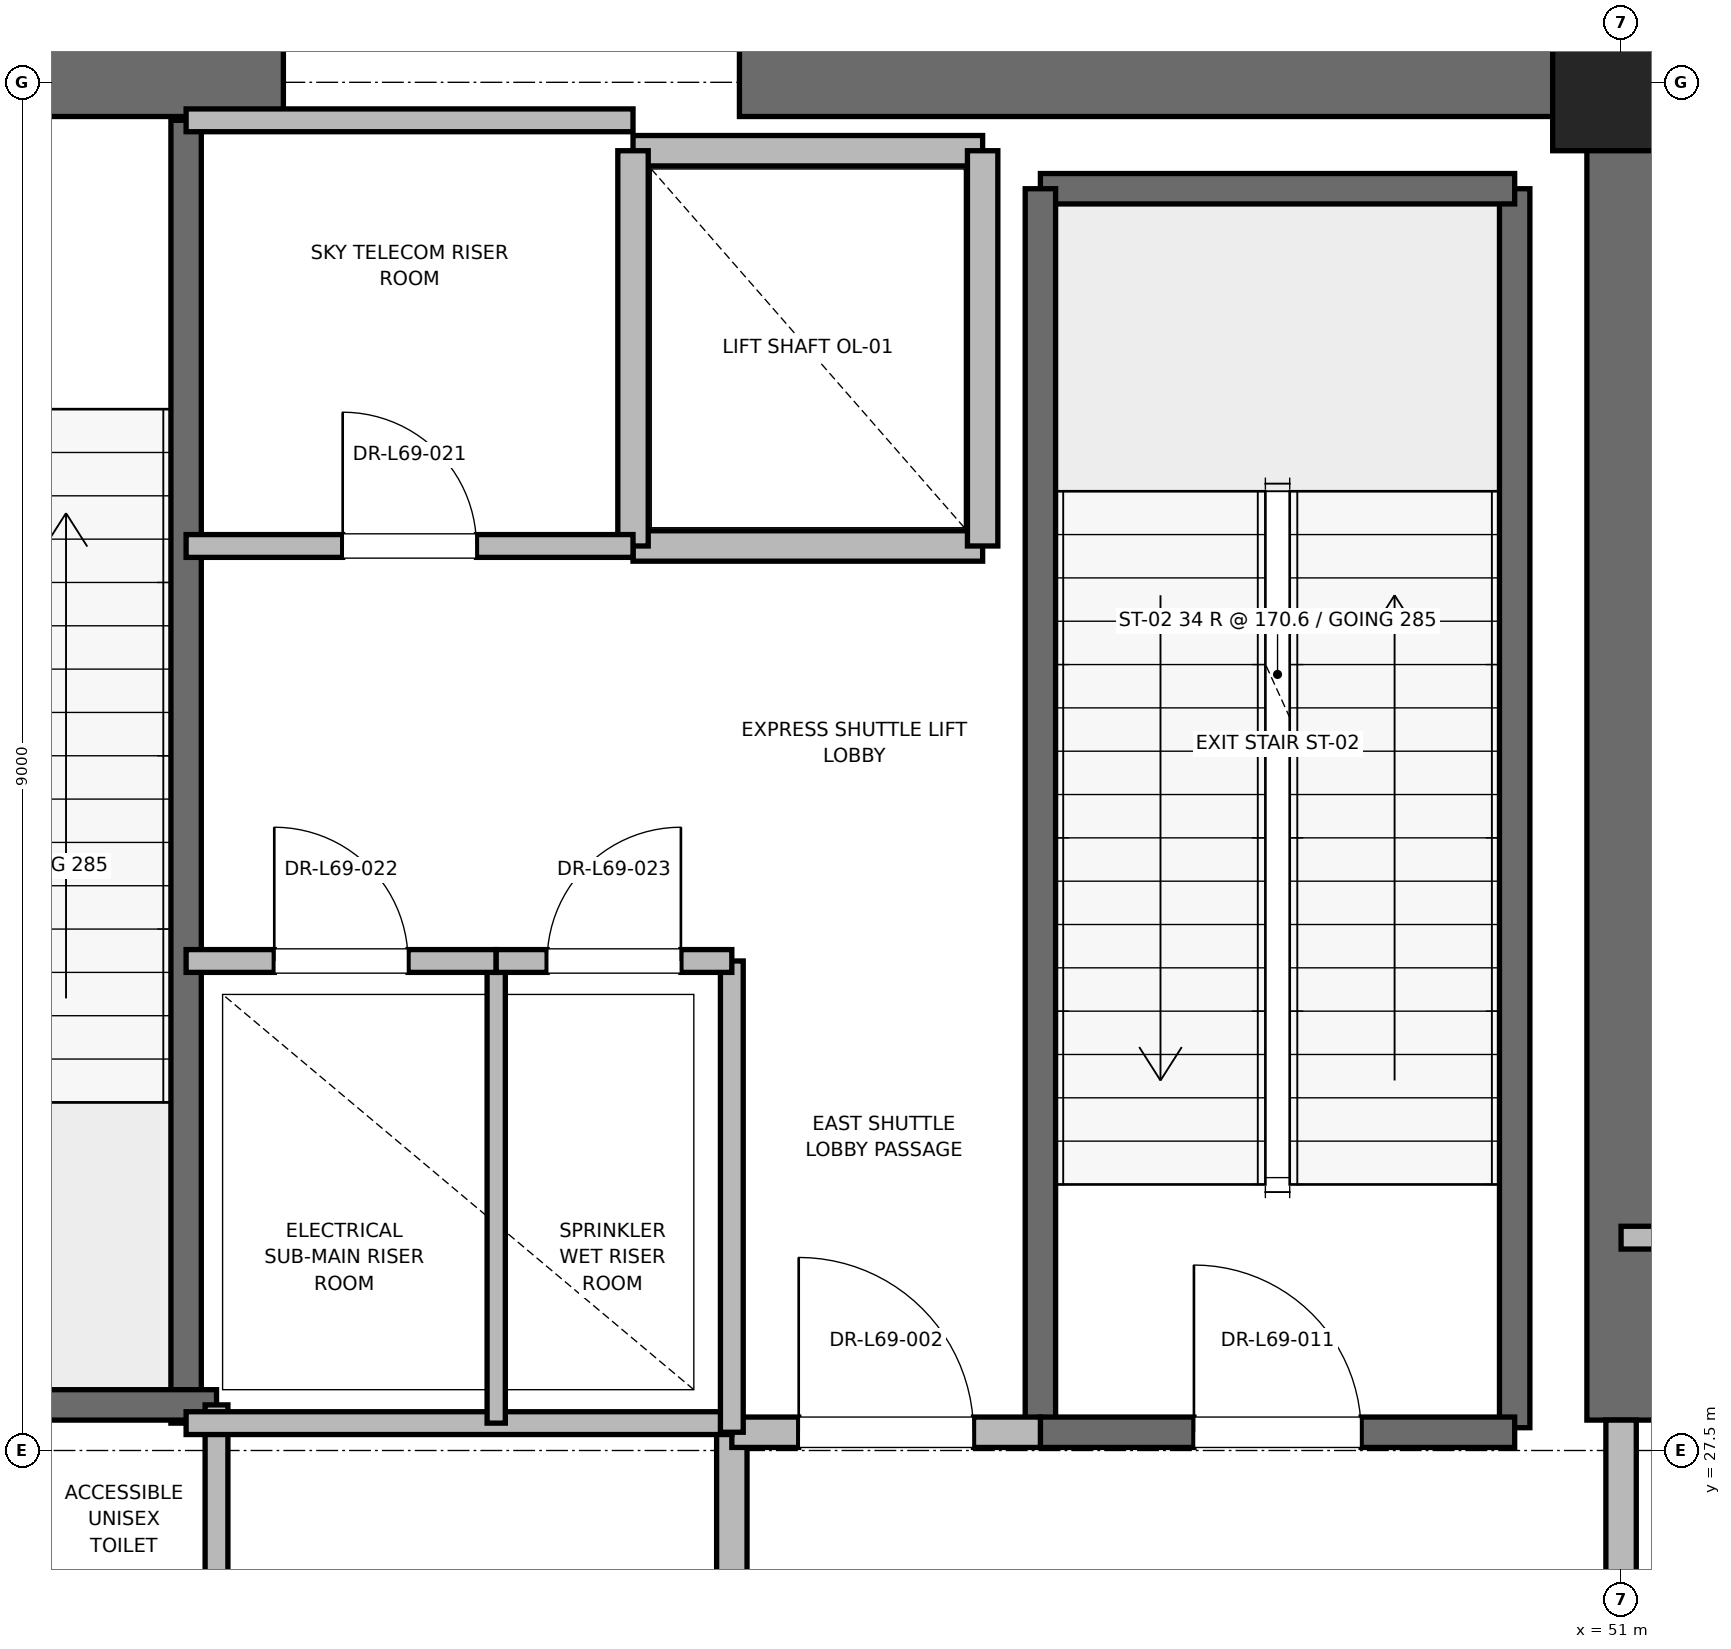
"""IFC4 building model, lengths in metres.
Left out: names, types, materials, properties, quantities, classifications, styles, units other than length and angle.
Written with IfcOpenShell. Run it as: python <this file> out.ifc"""

import sys

from ifc_helpers import new_model, si_unit, direction, frame, frame_2d, origin, origin_2d, place, context, subcontext, project, spatial, rectangle, extrude, element, fill, save


model = new_model("IFC4")
c1 = context("Model", 3, precision=1e-05, world=origin(), true_north=direction((0.0, 1.0)))
c2 = subcontext(c1, "Body", "Model", "MODEL_VIEW")
j1 = project(units=[si_unit("LENGTHUNIT", "METRE"), si_unit("PLANEANGLEUNIT", "RADIAN")], contexts=[c1])
p1 = place(None, origin())
s1 = spatial("IfcSite", under=j1, at=p1, CompositionType="ELEMENT")
p2 = place(p1, origin())
s2 = spatial("IfcBuilding", under=s1, at=p2, CompositionType="ELEMENT")
p3 = place(p2, frame((0.0, 0.0, 295.2)))
s3 = spatial("IfcBuildingStorey", under=s2, at=p3, CompositionType="ELEMENT", Elevation=295.2)
p4 = place(p3, frame((51.0, 36.5, 0.0), z_axis=(0.0, 0.0, 1.0), x_axis=(1.0, 0.0, 0.0)))
e1 = element("IfcColumn", 1, at=p4, inside=s3, PredefinedType="PILASTER", context=c2, shape_type="SweptSolid", body=[
    extrude(rectangle(XDim=0.9, YDim=0.9, at=origin_2d()), origin(), (0.0, 0.0, 1.0), 5.8),
])
p5 = place(p3, frame((37.8, 36.5, 0.0), z_axis=(0.0, 0.0, 1.0), x_axis=(1.0, 0.0, 0.0)))
e2 = element("IfcWall", 2, at=p5, inside=s3, PredefinedType="SHEAR", context=c2, shape_type="SweptSolid", body=[
    extrude(rectangle(XDim=4.4, YDim=0.45, at=frame_2d((2.2, 0.0))), origin(), (0.0, 0.0, 1.0), 5.5),
])
p6 = place(p5, frame((1.65, 0.0, 0.0)))
e3 = element("IfcOpeningElement", 3, at=p6, cuts=e2, PredefinedType="OPENING", context=c2, shape_type="SweptSolid", body=[
    extrude(rectangle(XDim=1.1, YDim=2.15, at=frame_2d((0.55, 1.075))), frame((0.0, 0.225, 0.0), z_axis=(0.0, -1.0, 0.0), x_axis=(1.0, 0.0, 0.0)), (0.0, 0.0, 1.0), 0.45),
])
p7 = place(p3, frame((45.2, 36.5, 0.0), z_axis=(0.0, 0.0, 1.0), x_axis=(1.0, 0.0, 0.0)))
e4 = element("IfcWall", 4, at=p7, inside=s3, PredefinedType="SHEAR", context=c2, shape_type="SweptSolid", body=[
    extrude(rectangle(XDim=5.8, YDim=0.45, at=frame_2d((2.9, 0.0))), origin(), (0.0, 0.0, 1.0), 5.5),
])
p8 = place(p3, frame((51.0, 27.7, 0.0), z_axis=(0.0, 0.0, 1.0), x_axis=(0.0, 1.0, 0.0)))
e5 = element("IfcWall", 5, at=p8, inside=s3, PredefinedType="SHEAR", context=c2, shape_type="SweptSolid", body=[
    extrude(rectangle(XDim=8.8, YDim=0.45, at=frame_2d((4.4, 0.0))), origin(), (0.0, 0.0, 1.0), 5.5),
])
p9 = place(p3, frame((50.3, 27.65, 0.0), z_axis=(0.0, 0.0, 1.0), x_axis=(0.0, 1.0, 0.0)))
e6 = element("IfcWall", 6, at=p9, inside=s3, PredefinedType="SOLIDWALL", context=c2, shape_type="SweptSolid", body=[
    extrude(rectangle(XDim=8.15, YDim=0.2, at=frame_2d((4.075, 0.0))), origin(), (0.0, 0.0, 1.0), 5.5),
])
p10 = place(p3, frame((47.18, 35.8, 0.0), z_axis=(0.0, 0.0, 1.0), x_axis=(1.0, 0.0, 0.0)))
e7 = element("IfcWall", 7, at=p10, inside=s3, PredefinedType="SOLIDWALL", context=c2, shape_type="SweptSolid", body=[
    extrude(rectangle(XDim=3.12, YDim=0.2, at=frame_2d((1.56, 0.0))), origin(), (0.0, 0.0, 1.0), 5.5),
])
p11 = place(p3, frame((47.18, 27.62, 0.0), z_axis=(0.0, 0.0, 1.0), x_axis=(0.0, 1.0, 0.0)))
e8 = element("IfcWall", 8, at=p11, inside=s3, PredefinedType="SOLIDWALL", context=c2, shape_type="SweptSolid", body=[
    extrude(rectangle(XDim=8.18, YDim=0.2, at=frame_2d((4.09, 0.0))), origin(), (0.0, 0.0, 1.0), 5.5),
])
p12 = place(p3, frame((47.18, 27.62, 0.0), z_axis=(0.0, 0.0, 1.0), x_axis=(1.0, 0.0, 0.0)))
e9 = element("IfcWall", 9, at=p12, inside=s3, PredefinedType="SOLIDWALL", context=c2, shape_type="SweptSolid", body=[
    extrude(rectangle(XDim=3.12, YDim=0.2, at=frame_2d((1.56, 0.0))), origin(), (0.0, 0.0, 1.0), 5.5),
])
p13 = place(p12, frame((1.01, 0.0, 0.0)))
e10 = element("IfcOpeningElement", 10, at=p13, cuts=e9, PredefinedType="OPENING", context=c2, shape_type="SweptSolid", body=[
    extrude(rectangle(XDim=1.1, YDim=2.15, at=frame_2d((0.55, 1.075))), frame((0.0, 0.1, 0.0), z_axis=(0.0, -1.0, 0.0), x_axis=(1.0, 0.0, 0.0)), (0.0, 0.0, 1.0), 0.2),
])
p14 = place(p3, frame((41.56, 27.68, 0.0), z_axis=(0.0, 0.0, 1.0), x_axis=(0.0, 1.0, 0.0)))
e11 = element("IfcWall", 11, at=p14, inside=s3, PredefinedType="SOLIDWALL", context=c2, shape_type="SweptSolid", body=[
    extrude(rectangle(XDim=8.57, YDim=0.2, at=frame_2d((4.285, 0.0))), origin(), (0.0, 0.0, 1.0), 5.5),
])
p15 = place(p3, frame((38.44, 27.8, 0.0), z_axis=(0.0, 0.0, 1.0), x_axis=(1.0, 0.0, 0.0)))
e12 = element("IfcWall", 12, at=p15, inside=s3, PredefinedType="SOLIDWALL", context=c2, shape_type="SweptSolid", body=[
    extrude(rectangle(XDim=3.32, YDim=0.2, at=frame_2d((1.66, 0.0))), origin(), (0.0, 0.0, 1.0), 5.5),
])
p16 = place(p3, frame((45.15, 24.25, 0.0), z_axis=(0.0, 0.0, 1.0), x_axis=(0.0, 1.0, 0.0)))
e13 = element("IfcWall", 13, at=p16, inside=s3, PredefinedType="PARTITIONING", context=c2, shape_type="SweptSolid", body=[
    extrude(rectangle(XDim=3.37, YDim=0.2, at=frame_2d((1.685, 0.0))), origin(), (0.0, 0.0, 1.0), 5.5),
])
p17 = place(p3, frame((45.15, 27.62, 0.0), z_axis=(0.0, 0.0, 1.0), x_axis=(1.0, 0.0, 0.0)))
e14 = element("IfcWall", 14, at=p17, inside=s3, PredefinedType="PARTITIONING", context=c2, shape_type="SweptSolid", body=[
    extrude(rectangle(XDim=2.03, YDim=0.2, at=frame_2d((1.015, 0.0))), origin(), (0.0, 0.0, 1.0), 5.5),
])
p18 = place(p17, frame((0.44, 0.0, 0.0)))
e15 = element("IfcOpeningElement", 15, at=p18, cuts=e14, PredefinedType="OPENING", context=c2, shape_type="SweptSolid", body=[
    extrude(rectangle(XDim=1.15, YDim=2.2, at=frame_2d((0.575, 1.1))), frame((0.0, 0.1, 0.0), z_axis=(0.0, -1.0, 0.0), x_axis=(1.0, 0.0, 0.0)), (0.0, 0.0, 1.0), 0.2),
])
p19 = place(p3, frame((51.0, 24.3, 0.0), z_axis=(0.0, 0.0, 1.0), x_axis=(0.0, 1.0, 0.0)))
e16 = element("IfcWall", 16, at=p19, inside=s3, PredefinedType="PARTITIONING", context=c2, shape_type="SweptSolid", body=[
    extrude(rectangle(XDim=3.4, YDim=0.2, at=frame_2d((1.7, 0.0))), origin(), (0.0, 0.0, 1.0), 4.58),
])
p20 = place(p19, frame((1.125, 0.0, 0.0)))
e17 = element("IfcOpeningElement", 17, at=p20, cuts=e16, PredefinedType="OPENING", context=c2, shape_type="SweptSolid", body=[
    extrude(rectangle(XDim=1.15, YDim=2.2, at=frame_2d((0.575, 1.1))), frame((0.0, 0.1, 0.0), z_axis=(0.0, -1.0, 0.0), x_axis=(1.0, 0.0, 0.0)), (0.0, 0.0, 1.0), 0.2),
])
p21 = place(p3, frame((44.5, 33.45, 0.0), z_axis=(0.0, 0.0, 1.0), x_axis=(1.0, 0.0, 0.0)))
e18 = element("IfcWall", 18, at=p21, inside=s3, PredefinedType="SOLIDWALL", context=c2, shape_type="SweptSolid", body=[
    extrude(rectangle(XDim=2.3, YDim=0.2, at=frame_2d((1.15, 0.0))), origin(), (0.0, 0.0, 1.0), 5.5),
])
p22 = place(p3, frame((46.8, 36.05, 0.0), z_axis=(0.0, 0.0, 1.0), x_axis=(-1.0, 0.0, 0.0)))
e19 = element("IfcWall", 19, at=p22, inside=s3, PredefinedType="SOLIDWALL", context=c2, shape_type="SweptSolid", body=[
    extrude(rectangle(XDim=2.3, YDim=0.2, at=frame_2d((1.15, 0.0))), origin(), (0.0, 0.0, 1.0), 4.58),
])
p23 = place(p3, frame((44.5, 36.05, 0.0), z_axis=(0.0, 0.0, 1.0), x_axis=(0.0, -1.0, 0.0)))
e20 = element("IfcWall", 20, at=p23, inside=s3, PredefinedType="SOLIDWALL", context=c2, shape_type="SweptSolid", body=[
    extrude(rectangle(XDim=2.6, YDim=0.2, at=frame_2d((1.3, 0.0))), origin(), (0.0, 0.0, 1.0), 4.58),
])
p24 = place(p3, frame((46.8, 33.45, 0.0), z_axis=(0.0, 0.0, 1.0), x_axis=(0.0, 1.0, 0.0)))
e21 = element("IfcWall", 21, at=p24, inside=s3, PredefinedType="SOLIDWALL", context=c2, shape_type="SweptSolid", body=[
    extrude(rectangle(XDim=2.6, YDim=0.2, at=frame_2d((1.3, 0.0))), origin(), (0.0, 0.0, 1.0), 5.5),
])
p25 = place(p3, frame((41.76, 23.8, 0.0), z_axis=(0.0, 0.0, 1.0), x_axis=(0.0, 1.0, 0.0)))
e22 = element("IfcWall", 22, at=p25, inside=s3, PredefinedType="PARTITIONING", context=c2, shape_type="SweptSolid", body=[
    extrude(rectangle(XDim=4.0, YDim=0.15, at=frame_2d((2.0, 0.0))), origin(), (0.0, 0.0, 1.0), 2.85),
])
p26 = place(p3, frame((41.56, 27.68, 0.0), z_axis=(0.0, 0.0, 1.0), x_axis=(1.0, 0.0, 0.0)))
e23 = element("IfcWall", 23, at=p26, inside=s3, PredefinedType="PARTITIONING", context=c2, shape_type="SweptSolid", body=[
    extrude(rectangle(XDim=3.59, YDim=0.15, at=frame_2d((1.795, 0.0))), origin(), (0.0, 0.0, 1.0), 2.85),
])
p27 = place(p3, frame((45.15, 27.62, 0.0), z_axis=(0.0, 0.0, 1.0), x_axis=(0.0, 1.0, 0.0)))
e24 = element("IfcWall", 24, at=p27, inside=s3, PredefinedType="PARTITIONING", context=c2, shape_type="SweptSolid", body=[
    extrude(rectangle(XDim=3.1, YDim=0.15, at=frame_2d((1.55, 0.0))), origin(), (0.0, 0.0, 1.0), 2.85),
])
p28 = place(p3, frame((43.6, 27.68, 0.0), z_axis=(0.0, 0.0, 1.0), x_axis=(0.0, 1.0, 0.0)))
e25 = element("IfcWall", 25, at=p28, inside=s3, PredefinedType="PARTITIONING", context=c2, shape_type="SweptSolid", body=[
    extrude(rectangle(XDim=3.04, YDim=0.12, at=frame_2d((1.52, 0.0))), origin(), (0.0, 0.0, 1.0), 2.85),
])
p29 = place(p3, frame((41.56, 30.72, 0.0), z_axis=(0.0, 0.0, 1.0), x_axis=(1.0, 0.0, 0.0)))
e26 = element("IfcWall", 26, at=p29, inside=s3, PredefinedType="PARTITIONING", context=c2, shape_type="SweptSolid", body=[
    extrude(rectangle(XDim=2.04, YDim=0.15, at=frame_2d((1.02, 0.0))), origin(), (0.0, 0.0, 1.0), 2.85),
])
p30 = place(p29, frame((0.58, 0.0, 0.0)))
e27 = element("IfcOpeningElement", 27, at=p30, cuts=e26, PredefinedType="OPENING", context=c2, shape_type="SweptSolid", body=[
    extrude(rectangle(XDim=0.88, YDim=2.1, at=frame_2d((0.44, 1.05))), frame((0.0, 0.075, 0.0), z_axis=(0.0, -1.0, 0.0), x_axis=(1.0, 0.0, 0.0)), (0.0, 0.0, 1.0), 0.15),
])
p31 = place(p3, frame((43.6, 30.72, 0.0), z_axis=(0.0, 0.0, 1.0), x_axis=(1.0, 0.0, 0.0)))
e28 = element("IfcWall", 28, at=p31, inside=s3, PredefinedType="PARTITIONING", context=c2, shape_type="SweptSolid", body=[
    extrude(rectangle(XDim=1.55, YDim=0.15, at=frame_2d((0.775, 0.0))), origin(), (0.0, 0.0, 1.0), 2.85),
])
p32 = place(p31, frame((0.335, 0.0, 0.0)))
e29 = element("IfcOpeningElement", 29, at=p32, cuts=e28, PredefinedType="OPENING", context=c2, shape_type="SweptSolid", body=[
    extrude(rectangle(XDim=0.88, YDim=2.1, at=frame_2d((0.44, 1.05))), frame((0.0, 0.075, 0.0), z_axis=(0.0, -1.0, 0.0), x_axis=(1.0, 0.0, 0.0)), (0.0, 0.0, 1.0), 0.15),
])
p33 = place(p3, frame((41.56, 36.25, 0.0), z_axis=(0.0, 0.0, 1.0), x_axis=(1.0, 0.0, 0.0)))
e30 = element("IfcWall", 30, at=p33, inside=s3, PredefinedType="PARTITIONING", context=c2, shape_type="SweptSolid", body=[
    extrude(rectangle(XDim=2.94, YDim=0.15, at=frame_2d((1.47, 0.0))), origin(), (0.0, 0.0, 1.0), 2.85),
])
p34 = place(p3, frame((41.56, 33.45, 0.0), z_axis=(0.0, 0.0, 1.0), x_axis=(1.0, 0.0, 0.0)))
e31 = element("IfcWall", 31, at=p34, inside=s3, PredefinedType="PARTITIONING", context=c2, shape_type="SweptSolid", body=[
    extrude(rectangle(XDim=2.94, YDim=0.15, at=frame_2d((1.47, 0.0))), origin(), (0.0, 0.0, 1.0), 2.85),
])
p35 = place(p34, frame((1.03, 0.0, 0.0)))
e32 = element("IfcOpeningElement", 32, at=p35, cuts=e31, PredefinedType="OPENING", context=c2, shape_type="SweptSolid", body=[
    extrude(rectangle(XDim=0.88, YDim=2.1, at=frame_2d((0.44, 1.05))), frame((0.0, 0.075, 0.0), z_axis=(0.0, -1.0, 0.0), x_axis=(1.0, 0.0, 0.0)), (0.0, 0.0, 1.0), 0.15),
])
p36 = place(p3, frame((51.0, 28.9, 0.0), z_axis=(0.0, 0.0, 1.0), x_axis=(1.0, 0.0, 0.0)))
e33 = element("IfcWall", 33, at=p36, inside=s3, PredefinedType="PARTITIONING", context=c2, shape_type="SweptSolid", body=[
    extrude(rectangle(XDim=3.0, YDim=0.15, at=frame_2d((1.5, 0.0))), origin(), (0.0, 0.0, 1.0), 2.85),
])
p37 = place(p36, frame((1.025, 0.0, 0.0)))
e34 = element("IfcOpeningElement", 34, at=p37, cuts=e33, PredefinedType="OPENING", context=c2, shape_type="SweptSolid", body=[
    extrude(rectangle(XDim=0.95, YDim=2.15, at=frame_2d((0.475, 1.075))), frame((0.0, 0.075, 0.0), z_axis=(0.0, -1.0, 0.0), x_axis=(1.0, 0.0, 0.0)), (0.0, 0.0, 1.0), 0.15),
])
p38 = place(p13, origin())
e35 = element("IfcDoor", 35, at=p38, inside=s3, OperationType="SINGLE_SWING_LEFT", PredefinedType="DOOR", context=c2, shape_type="SweptSolid", body=[
    extrude(rectangle(XDim=1.1, YDim=2.15, at=frame_2d((0.55, 1.075))), frame((0.0, 0.025, 0.0), z_axis=(0.0, -1.0, 0.0), x_axis=(1.0, 0.0, 0.0)), (0.0, 0.0, 1.0), 0.05),
])
fill(e10, e35)
p39 = place(p18, origin())
e36 = element("IfcDoor", 36, at=p39, inside=s3, OperationType="SINGLE_SWING_LEFT", PredefinedType="DOOR", context=c2, shape_type="SweptSolid", body=[
    extrude(rectangle(XDim=1.15, YDim=2.2, at=frame_2d((0.575, 1.1))), frame((0.0, 0.025, 0.0), z_axis=(0.0, -1.0, 0.0), x_axis=(1.0, 0.0, 0.0)), (0.0, 0.0, 1.0), 0.05),
])
fill(e15, e36)
p40 = place(p30, origin())
e37 = element("IfcDoor", 37, at=p40, inside=s3, OperationType="SINGLE_SWING_LEFT", PredefinedType="DOOR", context=c2, shape_type="SweptSolid", body=[
    extrude(rectangle(XDim=0.88, YDim=2.1, at=frame_2d((0.44, 1.05))), frame((0.0, 0.025, 0.0), z_axis=(0.0, -1.0, 0.0), x_axis=(1.0, 0.0, 0.0)), (0.0, 0.0, 1.0), 0.05),
])
fill(e27, e37)
p41 = place(p32, origin())
e38 = element("IfcDoor", 38, at=p41, inside=s3, OperationType="SINGLE_SWING_RIGHT", PredefinedType="DOOR", context=c2, shape_type="SweptSolid", body=[
    extrude(rectangle(XDim=0.88, YDim=2.1, at=frame_2d((0.44, 1.05))), frame((0.0, 0.025, 0.0), z_axis=(0.0, -1.0, 0.0), x_axis=(1.0, 0.0, 0.0)), (0.0, 0.0, 1.0), 0.05),
])
fill(e29, e38)
p42 = place(p35, origin())
e39 = element("IfcDoor", 39, at=p42, inside=s3, OperationType="SINGLE_SWING_LEFT", PredefinedType="DOOR", context=c2, shape_type="SweptSolid", body=[
    extrude(rectangle(XDim=0.88, YDim=2.1, at=frame_2d((0.44, 1.05))), frame((0.0, 0.025, 0.0), z_axis=(0.0, -1.0, 0.0), x_axis=(1.0, 0.0, 0.0)), (0.0, 0.0, 1.0), 0.05),
])
fill(e32, e39)
save(model, sys.argv[1])
